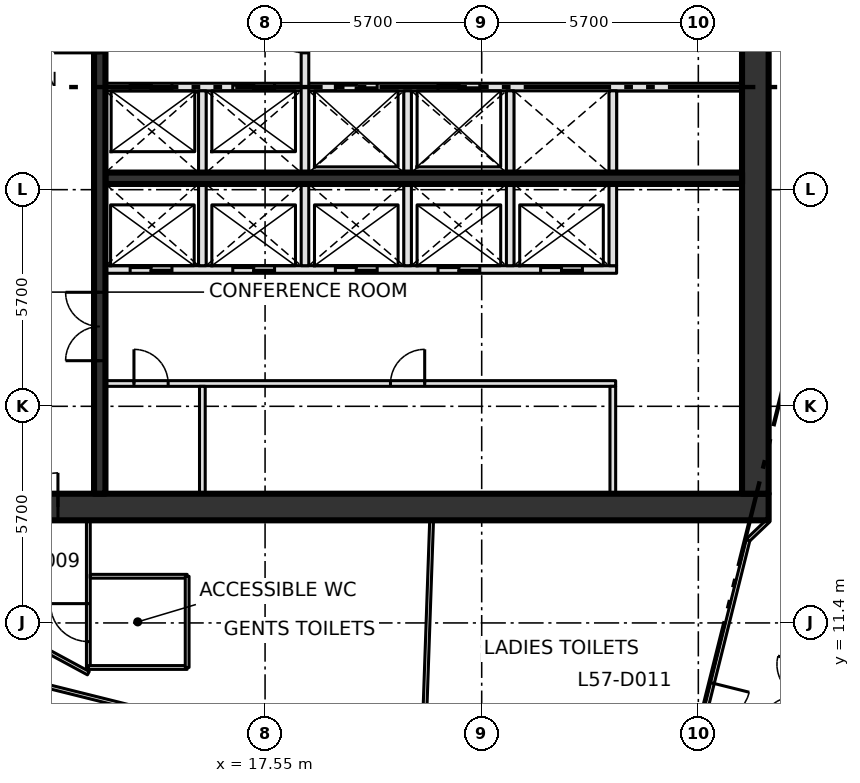
"""IFC4 building model, lengths in metres.
Left out: names, types, materials, properties, quantities, classifications, styles, units other than length and angle.
Written with IfcOpenShell. Run it as: python <this file> out.ifc"""

import sys

from ifc_helpers import new_model, si_unit, direction, frame, frame_2d, origin, place, context, subcontext, project, spatial, rectangle, extrude, element, fill, save


model = new_model("IFC4")
c1 = context("Model", 3, precision=1e-05, world=origin(), true_north=direction((0.0, 1.0)))
c2 = subcontext(c1, "Body", "Model", "MODEL_VIEW")
j1 = project(units=[si_unit("LENGTHUNIT", "METRE"), si_unit("PLANEANGLEUNIT", "RADIAN")], contexts=[c1])
p1 = place(None, origin())
s1 = spatial("IfcSite", under=j1, at=p1, CompositionType="ELEMENT")
p2 = place(p1, origin())
s2 = spatial("IfcBuilding", under=s1, at=p2, CompositionType="ELEMENT")
p3 = place(p2, frame((0.0, 0.0, 250.8)))
s3 = spatial("IfcBuildingStorey", under=s2, at=p3, CompositionType="ELEMENT", Elevation=250.8)
p4 = place(p3, frame((8.0, 14.45, -0.3), z_axis=(0.0, 0.0, 1.0), x_axis=(1.0, 0.0, 0.0)))
e1 = element("IfcWall", 1, at=p4, inside=s3, PredefinedType="SHEAR", context=c2, shape_type="SweptSolid", body=[
    extrude(rectangle(XDim=22.8, YDim=0.7, at=frame_2d((11.4, 0.0))), origin(), (0.0, 0.0, 1.0), 4.2),
])
p5 = place(p4, frame((2.3, 0.0, 0.3)))
e2 = element("IfcOpeningElement", 2, at=p5, cuts=e1, PredefinedType="OPENING", context=c2, shape_type="SweptSolid", body=[
    extrude(rectangle(XDim=1.8, YDim=2.1, at=frame_2d((0.9, 1.05))), frame((0.0, 0.36, 0.0), z_axis=(0.0, -1.0, 0.0), x_axis=(1.0, 0.0, 0.0)), (0.0, 0.0, 1.0), 0.72),
])
p6 = place(p3, frame((30.45, 14.8, -0.3), z_axis=(0.0, 0.0, 1.0), x_axis=(0.0, 1.0, 0.0)))
e3 = element("IfcWall", 3, at=p6, inside=s3, PredefinedType="SHEAR", context=c2, shape_type="SweptSolid", body=[
    extrude(rectangle(XDim=20.9, YDim=0.7, at=frame_2d((10.45, 0.0))), origin(), (0.0, 0.0, 1.0), 4.2),
])
p7 = place(p3, frame((13.35, 17.7, 0.0), z_axis=(0.0, 0.0, 1.0), x_axis=(1.0, 0.0, 0.0)))
e4 = element("IfcWall", 4, at=p7, inside=s3, PredefinedType="PARTITIONING", context=c2, shape_type="SweptSolid", body=[
    extrude(rectangle(XDim=13.425, YDim=0.15, at=frame_2d((6.712, 0.0))), origin(), (0.0, 0.0, 1.0), 3.9),
])
p8 = place(p7, frame((0.75, 0.0, 0.0)))
e5 = element("IfcOpeningElement", 5, at=p8, cuts=e4, PredefinedType="OPENING", context=c2, shape_type="SweptSolid", body=[
    extrude(rectangle(XDim=0.9, YDim=2.1, at=frame_2d((0.45, 1.05))), frame((0.0, 0.085, 0.0), z_axis=(0.0, -1.0, 0.0), x_axis=(1.0, 0.0, 0.0)), (0.0, 0.0, 1.0), 0.17),
])
p9 = place(p7, frame((7.5, 0.0, 0.0)))
e6 = element("IfcOpeningElement", 6, at=p9, cuts=e4, PredefinedType="OPENING", context=c2, shape_type="SweptSolid", body=[
    extrude(rectangle(XDim=0.9, YDim=2.1, at=frame_2d((0.45, 1.05))), frame((0.0, 0.085, 0.0), z_axis=(0.0, -1.0, 0.0), x_axis=(1.0, 0.0, 0.0)), (0.0, 0.0, 1.0), 0.17),
])
p10 = place(p3, frame((13.35, 20.7, 0.0), z_axis=(0.0, 0.0, 1.0), x_axis=(1.0, 0.0, 0.0)))
e7 = element("IfcWall", 7, at=p10, inside=s3, PredefinedType="SOLIDWALL", context=c2, shape_type="SweptSolid", body=[
    extrude(rectangle(XDim=13.45, YDim=0.2, at=frame_2d((6.725, 0.0))), origin(), (0.0, 0.0, 1.0), 3.9),
])
p11 = place(p10, frame((0.65, 0.0, 0.0)))
e8 = element("IfcOpeningElement", 8, at=p11, cuts=e7, PredefinedType="OPENING", context=c2, shape_type="SweptSolid", body=[
    extrude(rectangle(XDim=1.1, YDim=2.1, at=frame_2d((0.55, 1.05))), frame((0.0, 0.11, 0.0), z_axis=(0.0, -1.0, 0.0), x_axis=(1.0, 0.0, 0.0)), (0.0, 0.0, 1.0), 0.22),
])
p12 = place(p10, frame((3.35, 0.0, 0.0)))
e9 = element("IfcOpeningElement", 9, at=p12, cuts=e7, PredefinedType="OPENING", context=c2, shape_type="SweptSolid", body=[
    extrude(rectangle(XDim=1.1, YDim=2.1, at=frame_2d((0.55, 1.05))), frame((0.0, 0.11, 0.0), z_axis=(0.0, -1.0, 0.0), x_axis=(1.0, 0.0, 0.0)), (0.0, 0.0, 1.0), 0.22),
])
p13 = place(p10, frame((6.05, 0.0, 0.0)))
e10 = element("IfcOpeningElement", 10, at=p13, cuts=e7, PredefinedType="OPENING", context=c2, shape_type="SweptSolid", body=[
    extrude(rectangle(XDim=1.1, YDim=2.1, at=frame_2d((0.55, 1.05))), frame((0.0, 0.11, 0.0), z_axis=(0.0, -1.0, 0.0), x_axis=(1.0, 0.0, 0.0)), (0.0, 0.0, 1.0), 0.22),
])
p14 = place(p10, frame((8.75, 0.0, 0.0)))
e11 = element("IfcOpeningElement", 11, at=p14, cuts=e7, PredefinedType="OPENING", context=c2, shape_type="SweptSolid", body=[
    extrude(rectangle(XDim=1.1, YDim=2.1, at=frame_2d((0.55, 1.05))), frame((0.0, 0.11, 0.0), z_axis=(0.0, -1.0, 0.0), x_axis=(1.0, 0.0, 0.0)), (0.0, 0.0, 1.0), 0.22),
])
p15 = place(p10, frame((11.45, 0.0, 0.0)))
e12 = element("IfcOpeningElement", 12, at=p15, cuts=e7, PredefinedType="OPENING", context=c2, shape_type="SweptSolid", body=[
    extrude(rectangle(XDim=1.1, YDim=2.1, at=frame_2d((0.55, 1.05))), frame((0.0, 0.11, 0.0), z_axis=(0.0, -1.0, 0.0), x_axis=(1.0, 0.0, 0.0)), (0.0, 0.0, 1.0), 0.22),
])
p16 = place(p3, frame((13.35, 23.1, 0.0), z_axis=(0.0, 0.0, 1.0), x_axis=(1.0, 0.0, 0.0)))
e13 = element("IfcWall", 13, at=p16, inside=s3, PredefinedType="SHEAR", context=c2, shape_type="SweptSolid", body=[
    extrude(rectangle(XDim=16.75, YDim=0.3, at=frame_2d((8.375, 0.0))), origin(), (0.0, 0.0, 1.0), 3.9),
])
p17 = place(p3, frame((13.35, 25.5, 0.0), z_axis=(0.0, 0.0, 1.0), x_axis=(1.0, 0.0, 0.0)))
e14 = element("IfcWall", 14, at=p17, inside=s3, PredefinedType="SOLIDWALL", context=c2, shape_type="SweptSolid", body=[
    extrude(rectangle(XDim=16.75, YDim=0.2, at=frame_2d((8.375, 0.0))), origin(), (0.0, 0.0, 1.0), 3.9),
])
p18 = place(p17, frame((0.65, 0.0, 0.0)))
e15 = element("IfcOpeningElement", 15, at=p18, cuts=e14, PredefinedType="OPENING", context=c2, shape_type="SweptSolid", body=[
    extrude(rectangle(XDim=1.1, YDim=2.1, at=frame_2d((0.55, 1.05))), frame((0.0, 0.11, 0.0), z_axis=(0.0, -1.0, 0.0), x_axis=(1.0, 0.0, 0.0)), (0.0, 0.0, 1.0), 0.22),
])
p19 = place(p17, frame((3.35, 0.0, 0.0)))
e16 = element("IfcOpeningElement", 16, at=p19, cuts=e14, PredefinedType="OPENING", context=c2, shape_type="SweptSolid", body=[
    extrude(rectangle(XDim=1.1, YDim=2.1, at=frame_2d((0.55, 1.05))), frame((0.0, 0.11, 0.0), z_axis=(0.0, -1.0, 0.0), x_axis=(1.0, 0.0, 0.0)), (0.0, 0.0, 1.0), 0.22),
])
p20 = place(p17, frame((6.05, 0.0, 0.0)))
e17 = element("IfcOpeningElement", 17, at=p20, cuts=e14, PredefinedType="OPENING", context=c2, shape_type="SweptSolid", body=[
    extrude(rectangle(XDim=1.1, YDim=2.1, at=frame_2d((0.55, 1.05))), frame((0.0, 0.11, 0.0), z_axis=(0.0, -1.0, 0.0), x_axis=(1.0, 0.0, 0.0)), (0.0, 0.0, 1.0), 0.22),
])
p21 = place(p17, frame((8.75, 0.0, 0.0)))
e18 = element("IfcOpeningElement", 18, at=p21, cuts=e14, PredefinedType="OPENING", context=c2, shape_type="SweptSolid", body=[
    extrude(rectangle(XDim=1.1, YDim=2.1, at=frame_2d((0.55, 1.05))), frame((0.0, 0.11, 0.0), z_axis=(0.0, -1.0, 0.0), x_axis=(1.0, 0.0, 0.0)), (0.0, 0.0, 1.0), 0.22),
])
p22 = place(p3, frame((13.2, 14.8, 0.0), z_axis=(0.0, 0.0, 1.0), x_axis=(0.0, 1.0, 0.0)))
e19 = element("IfcWall", 19, at=p22, inside=s3, PredefinedType="SHEAR", context=c2, shape_type="SweptSolid", body=[
    extrude(rectangle(XDim=20.9, YDim=0.3, at=frame_2d((10.45, 0.0))), origin(), (0.0, 0.0, 1.0), 3.9),
])
p23 = place(p22, frame((3.5, 0.0, 0.0)))
e20 = element("IfcOpeningElement", 20, at=p23, cuts=e19, PredefinedType="OPENING", context=c2, shape_type="SweptSolid", body=[
    extrude(rectangle(XDim=1.8, YDim=2.1, at=frame_2d((0.9, 1.05))), frame((0.0, 0.16, 0.0), z_axis=(0.0, -1.0, 0.0), x_axis=(1.0, 0.0, 0.0)), (0.0, 0.0, 1.0), 0.32),
])
p24 = place(p22, frame((11.6, 0.0, 0.0)))
e21 = element("IfcOpeningElement", 21, at=p24, cuts=e19, PredefinedType="OPENING", context=c2, shape_type="SweptSolid", body=[
    extrude(rectangle(XDim=1.2, YDim=2.1, at=frame_2d((0.6, 1.05))), frame((0.0, 0.16, 0.0), z_axis=(0.0, -1.0, 0.0), x_axis=(1.0, 0.0, 0.0)), (0.0, 0.0, 1.0), 0.32),
])
p25 = place(p3, frame((15.9, 14.8, 0.0), z_axis=(0.0, 0.0, 1.0), x_axis=(0.0, 1.0, 0.0)))
e22 = element("IfcWall", 22, at=p25, inside=s3, PredefinedType="PARTITIONING", context=c2, shape_type="SweptSolid", body=[
    extrude(rectangle(XDim=2.825, YDim=0.15, at=frame_2d((1.413, 0.0))), origin(), (0.0, 0.0, 1.0), 3.9),
])
p26 = place(p3, frame((15.9, 20.8, 0.0), z_axis=(0.0, 0.0, 1.0), x_axis=(0.0, 1.0, 0.0)))
e23 = element("IfcWall", 23, at=p26, inside=s3, PredefinedType="SOLIDWALL", context=c2, shape_type="SweptSolid", body=[
    extrude(rectangle(XDim=4.6, YDim=0.2, at=frame_2d((2.3, 0.0))), origin(), (0.0, 0.0, 1.0), 3.9),
])
p27 = place(p3, frame((18.6, 20.8, 0.0), z_axis=(0.0, 0.0, 1.0), x_axis=(0.0, 1.0, 0.0)))
e24 = element("IfcWall", 24, at=p27, inside=s3, PredefinedType="SOLIDWALL", context=c2, shape_type="SweptSolid", body=[
    extrude(rectangle(XDim=7.6, YDim=0.2, at=frame_2d((3.8, 0.0))), origin(), (0.0, 0.0, 1.0), 3.9),
])
p28 = place(p27, frame((5.6, 0.0, 0.0)))
e25 = element("IfcOpeningElement", 25, at=p28, cuts=e24, PredefinedType="OPENING", context=c2, shape_type="SweptSolid", body=[
    extrude(rectangle(XDim=1.2, YDim=2.1, at=frame_2d((0.6, 1.05))), frame((0.0, 0.11, 0.0), z_axis=(0.0, -1.0, 0.0), x_axis=(1.0, 0.0, 0.0)), (0.0, 0.0, 1.0), 0.22),
])
for number, where, z_axis, x_axis in (
    (26, (21.3, 20.8, 0.0), (0.0, 0.0, 1.0), (0.0, 1.0, 0.0)),
    (27, (24.0, 20.8, 0.0), (0.0, 0.0, 1.0), (0.0, 1.0, 0.0)),
):
    element("IfcWall", number, at=place(p3, frame(where, z_axis=z_axis, x_axis=x_axis)), inside=s3, PredefinedType="SOLIDWALL", context=c2, shape_type="SweptSolid", body=[
        extrude(rectangle(XDim=4.6, YDim=0.2, at=frame_2d((2.3, 0.0))), origin(), (0.0, 0.0, 1.0), 3.9),
    ])
p29 = place(p3, frame((26.7, 14.8, 0.0), z_axis=(0.0, 0.0, 1.0), x_axis=(0.0, 1.0, 0.0)))
e28 = element("IfcWall", 28, at=p29, inside=s3, PredefinedType="PARTITIONING", context=c2, shape_type="SweptSolid", body=[
    extrude(rectangle(XDim=2.825, YDim=0.15, at=frame_2d((1.413, 0.0))), origin(), (0.0, 0.0, 1.0), 3.9),
])
p30 = place(p3, frame((26.7, 20.8, 0.0), z_axis=(0.0, 0.0, 1.0), x_axis=(0.0, 1.0, 0.0)))
e29 = element("IfcWall", 29, at=p30, inside=s3, PredefinedType="SOLIDWALL", context=c2, shape_type="SweptSolid", body=[
    extrude(rectangle(XDim=4.6, YDim=0.2, at=frame_2d((2.3, 0.0))), origin(), (0.0, 0.0, 1.0), 3.9),
])
p31 = place(p3, frame((8.988, 10.44, 0.0), z_axis=(0.0, 0.0, 1.0), x_axis=(0.970301223092, -0.241899848006, 0.0)))
e30 = element("IfcWall", 30, at=p31, inside=s3, PredefinedType="PARTITIONING", context=c2, shape_type="SweptSolid", body=[
    extrude(rectangle(XDim=19.879, YDim=0.1, at=frame_2d((9.94, 0.0))), origin(), (0.0, 0.0, 1.0), 3.9),
])
p32 = place(p3, frame((9.9, 11.7, 0.0), z_axis=(0.0, 0.0, 1.0), x_axis=(0.87965147249, -0.475618846291, 0.0)))
e31 = element("IfcWall", 31, at=p32, inside=s3, PredefinedType="PARTITIONING", context=c2, shape_type="SweptSolid", body=[
    extrude(rectangle(XDim=3.41, YDim=0.1, at=frame_2d((1.705, 0.0))), origin(), (0.0, 0.0, 1.0), 3.9),
])
p33 = place(p3, frame((12.9, 10.228, 0.0), z_axis=(0.0, 0.0, 1.0), x_axis=(0.0, 1.0, 0.0)))
e32 = element("IfcWall", 32, at=p33, inside=s3, PredefinedType="PARTITIONING", context=c2, shape_type="SweptSolid", body=[
    extrude(rectangle(XDim=3.872, YDim=0.1, at=frame_2d((1.936, 0.0))), origin(), (0.0, 0.0, 1.0), 3.9),
])
p34 = place(p33, frame((0.68, 0.0, 0.0)))
e33 = element("IfcOpeningElement", 33, at=p34, cuts=e32, PredefinedType="OPENING", context=c2, shape_type="SweptSolid", body=[
    extrude(rectangle(XDim=1.0, YDim=2.1, at=frame_2d((0.5, 1.05))), frame((0.0, 0.06, 0.0), z_axis=(0.0, -1.0, 0.0), x_axis=(1.0, 0.0, 0.0)), (0.0, 0.0, 1.0), 0.12),
])
p35 = place(p3, frame((30.259, 13.583, 0.0), z_axis=(0.0, 0.0, 1.0), x_axis=(-0.241841612879, -0.970315739479, 0.0)))
e34 = element("IfcWall", 34, at=p35, inside=s3, PredefinedType="PARTITIONING", context=c2, shape_type="SweptSolid", body=[
    extrude(rectangle(XDim=8.195, YDim=0.1, at=frame_2d((4.098, 0.0))), origin(), (0.0, 0.0, 1.0), 3.9),
])
p36 = place(p35, frame((3.88, 0.0, 0.0)))
e35 = element("IfcOpeningElement", 35, at=p36, cuts=e34, PredefinedType="OPENING", context=c2, shape_type="SweptSolid", body=[
    extrude(rectangle(XDim=1.0, YDim=2.1, at=frame_2d((0.5, 1.05))), frame((0.0, 0.06, 0.0), z_axis=(0.0, -1.0, 0.0), x_axis=(1.0, 0.0, 0.0)), (0.0, 0.0, 1.0), 0.12),
])
p37 = place(p3, frame((30.8, 14.1, 0.0), z_axis=(0.0, 0.0, 1.0), x_axis=(-0.722911025189, -0.690941133281, 0.0)))
e36 = element("IfcWall", 36, at=p37, inside=s3, PredefinedType="PARTITIONING", context=c2, shape_type="SweptSolid", body=[
    extrude(rectangle(XDim=0.748, YDim=0.1, at=frame_2d((0.374, 0.0))), origin(), (0.0, 0.0, 1.0), 3.9),
])
p38 = place(p3, frame((30.833, 5.963, 0.0), z_axis=(0.0, 0.0, 1.0), x_axis=(0.241902093757, 0.970300663215, 0.0)))
e37 = element("IfcWall", 37, at=p38, inside=s3, PredefinedType="PARTITIONING", context=c2, shape_type="SweptSolid", body=[
    extrude(rectangle(XDim=7.255, YDim=0.1, at=frame_2d((3.627, 0.0))), origin(), (0.0, 0.0, 1.0), 3.9),
])
p39 = place(p38, frame((2.68, 0.0, 0.0)))
e38 = element("IfcOpeningElement", 38, at=p39, cuts=e37, PredefinedType="OPENING", context=c2, shape_type="SweptSolid", body=[
    extrude(rectangle(XDim=1.8, YDim=2.1, at=frame_2d((0.9, 1.05))), frame((0.0, 0.06, 0.0), z_axis=(0.0, -1.0, 0.0), x_axis=(1.0, 0.0, 0.0)), (0.0, 0.0, 1.0), 0.12),
])
p40 = place(p3, frame((12.95, 12.628, 0.0), z_axis=(0.0, 0.0, 1.0), x_axis=(1.0, 0.0, 0.0)))
e39 = element("IfcWall", 39, at=p40, inside=s3, PredefinedType="PARTITIONING", context=c2, shape_type="SweptSolid", body=[
    extrude(rectangle(XDim=2.55, YDim=0.1, at=frame_2d((1.275, 0.0))), origin(), (0.0, 0.0, 1.0), 3.9),
])
p41 = place(p3, frame((15.5, 10.228, 0.0), z_axis=(0.0, 0.0, 1.0), x_axis=(-1.0, 0.0, 0.0)))
e40 = element("IfcWall", 40, at=p41, inside=s3, PredefinedType="PARTITIONING", context=c2, shape_type="SweptSolid", body=[
    extrude(rectangle(XDim=2.6, YDim=0.1, at=frame_2d((1.3, 0.0))), origin(), (0.0, 0.0, 1.0), 3.9),
])
p42 = place(p3, frame((15.5, 12.628, 0.0), z_axis=(0.0, 0.0, 1.0), x_axis=(0.0, -1.0, 0.0)))
e41 = element("IfcWall", 41, at=p42, inside=s3, PredefinedType="PARTITIONING", context=c2, shape_type="SweptSolid", body=[
    extrude(rectangle(XDim=2.4, YDim=0.1, at=frame_2d((1.2, 0.0))), origin(), (0.0, 0.0, 1.0), 3.9),
])
p43 = place(p3, frame((21.695, 7.334, 0.0), z_axis=(0.0, 0.0, 1.0), x_axis=(0.034978942342, 0.999388049555, 0.0)))
e42 = element("IfcWall", 42, at=p43, inside=s3, PredefinedType="PARTITIONING", context=c2, shape_type="SweptSolid", body=[
    extrude(rectangle(XDim=6.77, YDim=0.1, at=frame_2d((3.385, 0.0))), origin(), (0.0, 0.0, 1.0), 3.9),
])
p44 = place(p11, origin())
e43 = element("IfcDoor", 43, at=p44, inside=s3, OperationType="SLIDING_TO_LEFT", PredefinedType="DOOR", context=c2, shape_type="SweptSolid", body=[
    extrude(rectangle(XDim=1.1, YDim=2.1, at=frame_2d((0.55, 1.05))), frame((0.0, 0.025, 0.0), z_axis=(0.0, -1.0, 0.0), x_axis=(1.0, 0.0, 0.0)), (0.0, 0.0, 1.0), 0.05),
])
fill(e8, e43)
p45 = place(p12, origin())
e44 = element("IfcDoor", 44, at=p45, inside=s3, OperationType="SLIDING_TO_LEFT", PredefinedType="DOOR", context=c2, shape_type="SweptSolid", body=[
    extrude(rectangle(XDim=1.1, YDim=2.1, at=frame_2d((0.55, 1.05))), frame((0.0, 0.025, 0.0), z_axis=(0.0, -1.0, 0.0), x_axis=(1.0, 0.0, 0.0)), (0.0, 0.0, 1.0), 0.05),
])
fill(e9, e44)
p46 = place(p13, origin())
e45 = element("IfcDoor", 45, at=p46, inside=s3, OperationType="SLIDING_TO_LEFT", PredefinedType="DOOR", context=c2, shape_type="SweptSolid", body=[
    extrude(rectangle(XDim=1.1, YDim=2.1, at=frame_2d((0.55, 1.05))), frame((0.0, 0.025, 0.0), z_axis=(0.0, -1.0, 0.0), x_axis=(1.0, 0.0, 0.0)), (0.0, 0.0, 1.0), 0.05),
])
fill(e10, e45)
p47 = place(p14, origin())
e46 = element("IfcDoor", 46, at=p47, inside=s3, OperationType="SLIDING_TO_LEFT", PredefinedType="DOOR", context=c2, shape_type="SweptSolid", body=[
    extrude(rectangle(XDim=1.1, YDim=2.1, at=frame_2d((0.55, 1.05))), frame((0.0, 0.025, 0.0), z_axis=(0.0, -1.0, 0.0), x_axis=(1.0, 0.0, 0.0)), (0.0, 0.0, 1.0), 0.05),
])
fill(e11, e46)
p48 = place(p15, origin())
e47 = element("IfcDoor", 47, at=p48, inside=s3, OperationType="SLIDING_TO_LEFT", PredefinedType="DOOR", context=c2, shape_type="SweptSolid", body=[
    extrude(rectangle(XDim=1.1, YDim=2.1, at=frame_2d((0.55, 1.05))), frame((0.0, 0.025, 0.0), z_axis=(0.0, -1.0, 0.0), x_axis=(1.0, 0.0, 0.0)), (0.0, 0.0, 1.0), 0.05),
])
fill(e12, e47)
p49 = place(p18, origin())
e48 = element("IfcDoor", 48, at=p49, inside=s3, OperationType="SLIDING_TO_LEFT", PredefinedType="DOOR", context=c2, shape_type="SweptSolid", body=[
    extrude(rectangle(XDim=1.1, YDim=2.1, at=frame_2d((0.55, 1.05))), frame((0.0, 0.025, 0.0), z_axis=(0.0, -1.0, 0.0), x_axis=(1.0, 0.0, 0.0)), (0.0, 0.0, 1.0), 0.05),
])
fill(e15, e48)
p50 = place(p19, origin())
e49 = element("IfcDoor", 49, at=p50, inside=s3, OperationType="SLIDING_TO_LEFT", PredefinedType="DOOR", context=c2, shape_type="SweptSolid", body=[
    extrude(rectangle(XDim=1.1, YDim=2.1, at=frame_2d((0.55, 1.05))), frame((0.0, 0.025, 0.0), z_axis=(0.0, -1.0, 0.0), x_axis=(1.0, 0.0, 0.0)), (0.0, 0.0, 1.0), 0.05),
])
fill(e16, e49)
p51 = place(p20, origin())
e50 = element("IfcDoor", 50, at=p51, inside=s3, OperationType="SLIDING_TO_LEFT", PredefinedType="DOOR", context=c2, shape_type="SweptSolid", body=[
    extrude(rectangle(XDim=1.1, YDim=2.1, at=frame_2d((0.55, 1.05))), frame((0.0, 0.025, 0.0), z_axis=(0.0, -1.0, 0.0), x_axis=(1.0, 0.0, 0.0)), (0.0, 0.0, 1.0), 0.05),
])
fill(e17, e50)
p52 = place(p21, origin())
e51 = element("IfcDoor", 51, at=p52, inside=s3, OperationType="SLIDING_TO_LEFT", PredefinedType="DOOR", context=c2, shape_type="SweptSolid", body=[
    extrude(rectangle(XDim=1.1, YDim=2.1, at=frame_2d((0.55, 1.05))), frame((0.0, 0.025, 0.0), z_axis=(0.0, -1.0, 0.0), x_axis=(1.0, 0.0, 0.0)), (0.0, 0.0, 1.0), 0.05),
])
fill(e18, e51)
p53 = place(p8, origin())
e52 = element("IfcDoor", 52, at=p53, inside=s3, OperationType="SINGLE_SWING_LEFT", PredefinedType="DOOR", context=c2, shape_type="SweptSolid", body=[
    extrude(rectangle(XDim=0.9, YDim=2.1, at=frame_2d((0.45, 1.05))), frame((0.0, 0.025, 0.0), z_axis=(0.0, -1.0, 0.0), x_axis=(1.0, 0.0, 0.0)), (0.0, 0.0, 1.0), 0.05),
])
fill(e5, e52)
p54 = place(p9, origin())
e53 = element("IfcDoor", 53, at=p54, inside=s3, OperationType="SINGLE_SWING_RIGHT", PredefinedType="DOOR", context=c2, shape_type="SweptSolid", body=[
    extrude(rectangle(XDim=0.9, YDim=2.1, at=frame_2d((0.45, 1.05))), frame((0.0, 0.025, 0.0), z_axis=(0.0, -1.0, 0.0), x_axis=(1.0, 0.0, 0.0)), (0.0, 0.0, 1.0), 0.05),
])
fill(e6, e53)
p55 = place(p23, origin())
e54 = element("IfcDoor", 54, at=p55, inside=s3, OperationType="DOUBLE_DOOR_SINGLE_SWING", PredefinedType="DOOR", context=c2, shape_type="SweptSolid", body=[
    extrude(rectangle(XDim=1.8, YDim=2.1, at=frame_2d((0.9, 1.05))), frame((0.0, 0.025, 0.0), z_axis=(0.0, -1.0, 0.0), x_axis=(1.0, 0.0, 0.0)), (0.0, 0.0, 1.0), 0.05),
])
fill(e20, e54)
p56 = place(p5, origin())
e55 = element("IfcDoor", 55, at=p56, inside=s3, OperationType="DOUBLE_DOOR_SINGLE_SWING", PredefinedType="DOOR", context=c2, shape_type="SweptSolid", body=[
    extrude(rectangle(XDim=1.8, YDim=2.1, at=frame_2d((0.9, 1.05))), frame((0.0, 0.025, 0.0), z_axis=(0.0, -1.0, 0.0), x_axis=(1.0, 0.0, 0.0)), (0.0, 0.0, 1.0), 0.05),
])
fill(e2, e55)
p57 = place(p34, origin())
e56 = element("IfcDoor", 56, at=p57, inside=s3, OperationType="SINGLE_SWING_RIGHT", PredefinedType="DOOR", context=c2, shape_type="SweptSolid", body=[
    extrude(rectangle(XDim=1.0, YDim=2.1, at=frame_2d((0.5, 1.05))), frame((0.0, 0.025, 0.0), z_axis=(0.0, -1.0, 0.0), x_axis=(1.0, 0.0, 0.0)), (0.0, 0.0, 1.0), 0.05),
])
fill(e33, e56)
p58 = place(p36, origin())
e57 = element("IfcDoor", 57, at=p58, inside=s3, OperationType="SINGLE_SWING_LEFT", PredefinedType="DOOR", context=c2, shape_type="SweptSolid", body=[
    extrude(rectangle(XDim=1.0, YDim=2.1, at=frame_2d((0.5, 1.05))), frame((0.0, 0.025, 0.0), z_axis=(0.0, -1.0, 0.0), x_axis=(1.0, 0.0, 0.0)), (0.0, 0.0, 1.0), 0.05),
])
fill(e35, e57)
save(model, sys.argv[1])
